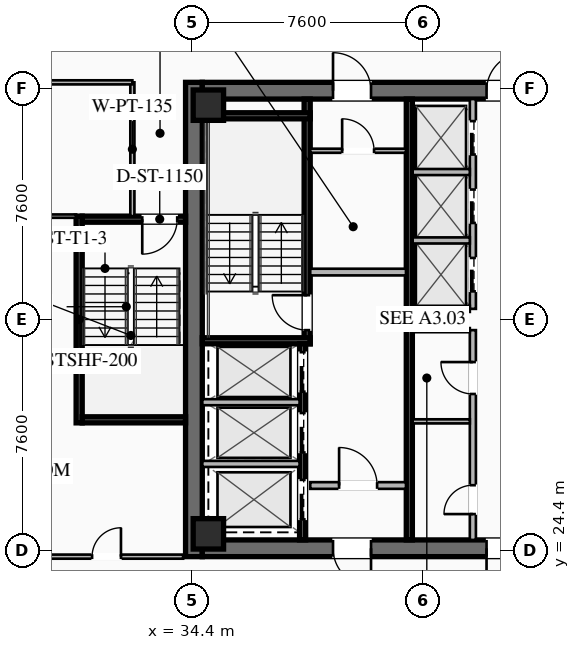
"""IFC4 building model, lengths in metres.
Left out: names, types, materials, properties, quantities, classifications, styles, units other than length and angle.
Written with IfcOpenShell. Run it as: python <this file> out.ifc"""

import sys

from ifc_helpers import new_model, si_unit, direction, frame, frame_2d, origin, origin_2d, place, context, subcontext, project, spatial, rectangle, hollow_rectangle, extrude, element, fill, save


model = new_model("IFC4")
c1 = context("Model", 3, precision=1e-05, world=origin(), true_north=direction((0.0, 1.0)))
c2 = subcontext(c1, "Body", "Model", "MODEL_VIEW")
j1 = project(units=[si_unit("LENGTHUNIT", "METRE"), si_unit("PLANEANGLEUNIT", "RADIAN")], contexts=[c1])
p1 = place(None, origin())
s1 = spatial("IfcSite", under=j1, at=p1, CompositionType="ELEMENT")
p2 = place(p1, origin())
s2 = spatial("IfcBuilding", under=s1, at=p2, CompositionType="ELEMENT")
p3 = place(p2, frame((0.0, 0.0, 149.9)))
s3 = spatial("IfcBuildingStorey", under=s2, at=p3, CompositionType="ELEMENT", Elevation=149.9)
p4 = place(p3, frame((34.475, 24.2, 0.0), z_axis=(0.0, 0.0, 1.0), x_axis=(0.0, 1.0, 0.0)))
e1 = element("IfcWall", 1, at=p4, inside=s3, PredefinedType="SHEAR", context=c2, shape_type="SweptSolid", body=[
    extrude(rectangle(XDim=15.6, YDim=0.55, at=frame_2d((7.8, 0.0))), origin(), (0.0, 0.0, 1.0), 3.55),
])
p5 = place(p3, frame((49.25, 24.475, 0.0), z_axis=(0.0, 0.0, 1.0), x_axis=(-1.0, 0.0, 0.0)))
e2 = element("IfcWall", 2, at=p5, inside=s3, PredefinedType="SHEAR", context=c2, shape_type="SweptSolid", body=[
    extrude(rectangle(XDim=14.5, YDim=0.55, at=frame_2d((7.25, 0.0))), origin(), (0.0, 0.0, 1.0), 3.55),
])
p6 = place(p5, frame((8.95, 0.0, 0.0)))
e3 = element("IfcOpeningElement", 3, at=p6, cuts=e2, PredefinedType="OPENING", context=c2, shape_type="SweptSolid", body=[
    extrude(rectangle(XDim=1.25, YDim=2.25, at=frame_2d((0.625, 1.125))), frame((0.0, 0.285, 0.0), z_axis=(0.0, -1.0, 0.0), x_axis=(1.0, 0.0, 0.0)), (0.0, 0.0, 1.0), 0.57),
])
p7 = place(p5, frame((3.9, 0.0, 0.0)))
e4 = element("IfcOpeningElement", 4, at=p7, cuts=e2, PredefinedType="OPENING", context=c2, shape_type="SweptSolid", body=[
    extrude(rectangle(XDim=1.25, YDim=2.25, at=frame_2d((0.625, 1.125))), frame((0.0, 0.285, 0.0), z_axis=(0.0, -1.0, 0.0), x_axis=(1.0, 0.0, 0.0)), (0.0, 0.0, 1.0), 0.57),
])
p8 = place(p3, frame((34.75, 39.525, 0.0), z_axis=(0.0, 0.0, 1.0), x_axis=(1.0, 0.0, 0.0)))
e5 = element("IfcWall", 5, at=p8, inside=s3, PredefinedType="SHEAR", context=c2, shape_type="SweptSolid", body=[
    extrude(rectangle(XDim=14.5, YDim=0.55, at=frame_2d((7.25, 0.0))), origin(), (0.0, 0.0, 1.0), 3.55),
])
p9 = place(p8, frame((4.3, 0.0, 0.0)))
e6 = element("IfcOpeningElement", 6, at=p9, cuts=e5, PredefinedType="OPENING", context=c2, shape_type="SweptSolid", body=[
    extrude(rectangle(XDim=1.25, YDim=2.25, at=frame_2d((0.625, 1.125))), frame((0.0, 0.285, 0.0), z_axis=(0.0, -1.0, 0.0), x_axis=(1.0, 0.0, 0.0)), (0.0, 0.0, 1.0), 0.57),
])
p10 = place(p8, frame((9.35, 0.0, 0.0)))
e7 = element("IfcOpeningElement", 7, at=p10, cuts=e5, PredefinedType="OPENING", context=c2, shape_type="SweptSolid", body=[
    extrude(rectangle(XDim=1.25, YDim=2.25, at=frame_2d((0.625, 1.125))), frame((0.0, 0.285, 0.0), z_axis=(0.0, -1.0, 0.0), x_axis=(1.0, 0.0, 0.0)), (0.0, 0.0, 1.0), 0.57),
])
for number, where, z_axis, x_axis in (
    (8, (34.95, 24.95, 0.0), (0.0, 0.0, 1.0), (1.0, 0.0, 0.0)),
    (9, (34.95, 39.05, 0.0), (0.0, 0.0, 1.0), (1.0, 0.0, 0.0)),
):
    element("IfcColumn", number, at=place(p3, frame(where, z_axis=z_axis, x_axis=x_axis)), inside=s3, PredefinedType="COLUMN", context=c2, shape_type="SweptSolid", body=[
        extrude(hollow_rectangle(XDim=1.0, YDim=1.0, WallThickness=0.04, at=origin_2d()), origin(), (0.0, 0.0, 1.0), 3.37),
    ])
p11 = place(p3, frame((38.2, 31.2, 0.0), z_axis=(0.0, 0.0, 1.0), x_axis=(0.0, 1.0, 0.0)))
e10 = element("IfcWall", 10, at=p11, inside=s3, PredefinedType="SHEAR", context=c2, shape_type="SweptSolid", body=[
    extrude(rectangle(XDim=8.05, YDim=0.2, at=frame_2d((4.025, 0.0))), origin(), (0.0, 0.0, 1.0), 3.37),
])
p12 = place(p11, frame((0.45, 0.0, 0.0)))
e11 = element("IfcOpeningElement", 11, at=p12, cuts=e10, PredefinedType="OPENING", context=c2, shape_type="SweptSolid", body=[
    extrude(rectangle(XDim=1.15, YDim=2.2, at=frame_2d((0.575, 1.1))), frame((0.0, 0.11, 0.0), z_axis=(0.0, -1.0, 0.0), x_axis=(1.0, 0.0, 0.0)), (0.0, 0.0, 1.0), 0.22),
])
for number, where, z_axis, x_axis in (
    (12, (34.75, 31.3, 0.0), (0.0, 0.0, 1.0), (1.0, 0.0, 0.0)),
    (13, (34.75, 38.7, 0.0), (0.0, 0.0, 1.0), (1.0, 0.0, 0.0)),
):
    element("IfcWall", number, at=place(p3, frame(where, z_axis=z_axis, x_axis=x_axis)), inside=s3, PredefinedType="SHEAR", context=c2, shape_type="SweptSolid", body=[
        extrude(rectangle(XDim=3.55, YDim=0.2, at=frame_2d((1.775, 0.0))), origin(), (0.0, 0.0, 1.0), 3.37),
    ])
p13 = place(p3, frame((41.56, 24.75, 0.0), z_axis=(0.0, 0.0, 1.0), x_axis=(0.0, 1.0, 0.0)))
e14 = element("IfcWall", 14, at=p13, inside=s3, PredefinedType="SHEAR", context=c2, shape_type="SweptSolid", body=[
    extrude(rectangle(XDim=14.5, YDim=0.2, at=frame_2d((7.25, 0.0))), origin(), (0.0, 0.0, 1.0), 3.37),
])
p14 = place(p3, frame((38.3, 33.56, 0.0), z_axis=(0.0, 0.0, 1.0), x_axis=(1.0, 0.0, 0.0)))
e15 = element("IfcWall", 15, at=p14, inside=s3, PredefinedType="SOLIDWALL", context=c2, shape_type="SweptSolid", body=[
    extrude(rectangle(XDim=3.15, YDim=0.22, at=frame_2d((1.575, 0.0))), origin(), (0.0, 0.0, 1.0), 2.723),
])
p15 = place(p3, frame((38.3, 26.54, 0.0), z_axis=(0.0, 0.0, 1.0), x_axis=(1.0, 0.0, 0.0)))
e16 = element("IfcWall", 16, at=p15, inside=s3, PredefinedType="SOLIDWALL", context=c2, shape_type="SweptSolid", body=[
    extrude(rectangle(XDim=3.15, YDim=0.22, at=frame_2d((1.575, 0.0))), origin(), (0.0, 0.0, 1.0), 2.723),
])
p16 = place(p15, frame((0.95, 0.0, 0.0)))
e17 = element("IfcOpeningElement", 17, at=p16, cuts=e16, PredefinedType="OPENING", context=c2, shape_type="SweptSolid", body=[
    extrude(rectangle(XDim=1.25, YDim=2.25, at=frame_2d((0.625, 1.125))), frame((0.0, 0.12, 0.0), z_axis=(0.0, -1.0, 0.0), x_axis=(1.0, 0.0, 0.0)), (0.0, 0.0, 1.0), 0.24),
])
p17 = place(p3, frame((38.05, 24.75, 0.0), z_axis=(0.0, 0.0, 1.0), x_axis=(0.0, 1.0, 0.0)))
e18 = element("IfcWall", 18, at=p17, inside=s3, PredefinedType="SHEAR", context=c2, shape_type="SweptSolid", body=[
    extrude(rectangle(XDim=6.45, YDim=0.2, at=frame_2d((3.225, 0.0))), origin(), (0.0, 0.0, 1.0), 3.37),
])
p18 = place(p17, frame((4.875, 0.0, 0.0)))
e19 = element("IfcOpeningElement", 19, at=p18, cuts=e18, PredefinedType="OPENING", context=c2, shape_type="SweptSolid", body=[
    extrude(rectangle(XDim=1.3, YDim=2.25, at=frame_2d((0.65, 1.125))), frame((0.0, 0.11, 0.0), z_axis=(0.0, -1.0, 0.0), x_axis=(1.0, 0.0, 0.0)), (0.0, 0.0, 1.0), 0.22),
])
p19 = place(p17, frame((2.875, 0.0, 0.0)))
e20 = element("IfcOpeningElement", 20, at=p19, cuts=e18, PredefinedType="OPENING", context=c2, shape_type="SweptSolid", body=[
    extrude(rectangle(XDim=1.3, YDim=2.25, at=frame_2d((0.65, 1.125))), frame((0.0, 0.11, 0.0), z_axis=(0.0, -1.0, 0.0), x_axis=(1.0, 0.0, 0.0)), (0.0, 0.0, 1.0), 0.22),
])
p20 = place(p17, frame((0.675, 0.0, 0.0)))
e21 = element("IfcOpeningElement", 21, at=p20, cuts=e18, PredefinedType="OPENING", context=c2, shape_type="SweptSolid", body=[
    extrude(rectangle(XDim=1.3, YDim=2.25, at=frame_2d((0.65, 1.125))), frame((0.0, 0.11, 0.0), z_axis=(0.0, -1.0, 0.0), x_axis=(1.0, 0.0, 0.0)), (0.0, 0.0, 1.0), 0.22),
])
for number, where, z_axis, x_axis in (
    (22, (34.75, 27.25, 0.0), (0.0, 0.0, 1.0), (1.0, 0.0, 0.0)),
    (23, (34.75, 29.28, 0.0), (0.0, 0.0, 1.0), (1.0, 0.0, 0.0)),
):
    element("IfcWall", number, at=place(p3, frame(where, z_axis=z_axis, x_axis=x_axis)), inside=s3, PredefinedType="SOLIDWALL", context=c2, shape_type="SweptSolid", body=[
        extrude(rectangle(XDim=3.2, YDim=0.2, at=frame_2d((1.6, 0.0))), origin(), (0.0, 0.0, 1.0), 3.37),
    ])
p21 = place(p3, frame((38.3, 37.55, 0.0), z_axis=(0.0, 0.0, 1.0), x_axis=(1.0, 0.0, 0.0)))
e24 = element("IfcWall", 24, at=p21, inside=s3, PredefinedType="PARTITIONING", context=c2, shape_type="SweptSolid", body=[
    extrude(rectangle(XDim=3.15, YDim=0.135, at=frame_2d((1.575, 0.0))), origin(), (0.0, 0.0, 1.0), 2.723),
])
p22 = place(p21, frame((1.05, 0.0, 0.0)))
e25 = element("IfcOpeningElement", 25, at=p22, cuts=e24, PredefinedType="OPENING", context=c2, shape_type="SweptSolid", body=[
    extrude(rectangle(XDim=1.05, YDim=2.2, at=frame_2d((0.525, 1.1))), frame((0.0, 0.077, 0.0), z_axis=(0.0, -1.0, 0.0), x_axis=(1.0, 0.0, 0.0)), (0.0, 0.0, 1.0), 0.155),
])
p23 = place(p3, frame((43.65, 24.75, 0.0), z_axis=(0.0, 0.0, 1.0), x_axis=(0.0, 1.0, 0.0)))
e26 = element("IfcWall", 26, at=p23, inside=s3, PredefinedType="SOLIDWALL", context=c2, shape_type="SweptSolid", body=[
    extrude(rectangle(XDim=6.9, YDim=0.2, at=frame_2d((3.45, 0.0))), origin(), (0.0, 0.0, 1.0), 2.723),
])
p24 = place(p23, frame((0.85, 0.0, 0.0)))
e27 = element("IfcOpeningElement", 27, at=p24, cuts=e26, PredefinedType="OPENING", context=c2, shape_type="SweptSolid", body=[
    extrude(rectangle(XDim=0.95, YDim=2.05, at=frame_2d((0.475, 1.025))), frame((0.0, 0.11, 0.0), z_axis=(0.0, -1.0, 0.0), x_axis=(1.0, 0.0, 0.0)), (0.0, 0.0, 1.0), 0.22),
])
p25 = place(p23, frame((4.8, 0.0, 0.0)))
e28 = element("IfcOpeningElement", 28, at=p25, cuts=e26, PredefinedType="OPENING", context=c2, shape_type="SweptSolid", body=[
    extrude(rectangle(XDim=1.05, YDim=2.2, at=frame_2d((0.525, 1.1))), frame((0.0, 0.11, 0.0), z_axis=(0.0, -1.0, 0.0), x_axis=(1.0, 0.0, 0.0)), (0.0, 0.0, 1.0), 0.22),
])
for number, where, z_axis, x_axis in (
    (29, (41.67, 31.65, 0.0), (0.0, 0.0, 1.0), (1.0, 0.0, 0.0)),
    (30, (41.67, 28.65, 0.0), (0.0, 0.0, 1.0), (1.0, 0.0, 0.0)),
):
    element("IfcWall", number, at=place(p3, frame(where, z_axis=z_axis, x_axis=x_axis)), inside=s3, PredefinedType="PARTITIONING", context=c2, shape_type="SweptSolid", body=[
        extrude(rectangle(XDim=1.88, YDim=0.135, at=frame_2d((0.94, 0.0))), origin(), (0.0, 0.0, 1.0), 2.723),
    ])
p26 = place(p3, frame((43.65, 32.35, 0.0), z_axis=(0.0, 0.0, 1.0), x_axis=(0.0, 1.0, 0.0)))
e31 = element("IfcWall", 31, at=p26, inside=s3, PredefinedType="SOLIDWALL", context=c2, shape_type="SweptSolid", body=[
    extrude(rectangle(XDim=6.9, YDim=0.2, at=frame_2d((3.45, 0.0))), origin(), (0.0, 0.0, 1.0), 3.37),
])
p27 = place(p26, frame((0.575, 0.0, 0.0)))
e32 = element("IfcOpeningElement", 32, at=p27, cuts=e31, PredefinedType="OPENING", context=c2, shape_type="SweptSolid", body=[
    extrude(rectangle(XDim=1.1, YDim=2.2, at=frame_2d((0.55, 1.1))), frame((0.0, 0.11, 0.0), z_axis=(0.0, -1.0, 0.0), x_axis=(1.0, 0.0, 0.0)), (0.0, 0.0, 1.0), 0.22),
])
p28 = place(p26, frame((2.825, 0.0, 0.0)))
e33 = element("IfcOpeningElement", 33, at=p28, cuts=e31, PredefinedType="OPENING", context=c2, shape_type="SweptSolid", body=[
    extrude(rectangle(XDim=1.1, YDim=2.2, at=frame_2d((0.55, 1.1))), frame((0.0, 0.11, 0.0), z_axis=(0.0, -1.0, 0.0), x_axis=(1.0, 0.0, 0.0)), (0.0, 0.0, 1.0), 0.22),
])
p29 = place(p26, frame((5.075, 0.0, 0.0)))
e34 = element("IfcOpeningElement", 34, at=p29, cuts=e31, PredefinedType="OPENING", context=c2, shape_type="SweptSolid", body=[
    extrude(rectangle(XDim=1.1, YDim=2.2, at=frame_2d((0.55, 1.1))), frame((0.0, 0.11, 0.0), z_axis=(0.0, -1.0, 0.0), x_axis=(1.0, 0.0, 0.0)), (0.0, 0.0, 1.0), 0.22),
])
for number, where, z_axis, x_axis in (
    (35, (41.67, 32.35, 0.0), (0.0, 0.0, 1.0), (1.0, 0.0, 0.0)),
    (36, (41.67, 34.6, 0.0), (0.0, 0.0, 1.0), (1.0, 0.0, 0.0)),
    (37, (41.67, 36.85, 0.0), (0.0, 0.0, 1.0), (1.0, 0.0, 0.0)),
):
    element("IfcWall", number, at=place(p3, frame(where, z_axis=z_axis, x_axis=x_axis)), inside=s3, PredefinedType="SOLIDWALL", context=c2, shape_type="SweptSolid", body=[
        extrude(rectangle(XDim=1.88, YDim=0.2, at=frame_2d((0.94, 0.0))), origin(), (0.0, 0.0, 1.0), 3.37),
    ])
p30 = place(p3, frame((30.7, 28.6, 0.0), z_axis=(0.0, 0.0, 1.0), x_axis=(0.0, 1.0, 0.0)))
e38 = element("IfcWall", 38, at=p30, inside=s3, PredefinedType="SHEAR", context=c2, shape_type="SweptSolid", body=[
    extrude(rectangle(XDim=6.8, YDim=0.2, at=frame_2d((3.4, 0.0))), origin(), (0.0, 0.0, 1.0), 3.37),
])
p31 = place(p3, frame((34.2, 35.3, 0.0), z_axis=(0.0, 0.0, 1.0), x_axis=(-1.0, 0.0, 0.0)))
e39 = element("IfcWall", 39, at=p31, inside=s3, PredefinedType="SHEAR", context=c2, shape_type="SweptSolid", body=[
    extrude(rectangle(XDim=3.4, YDim=0.2, at=frame_2d((1.7, 0.0))), origin(), (0.0, 0.0, 1.0), 3.37),
])
p32 = place(p31, frame((0.275, 0.0, 0.0)))
e40 = element("IfcOpeningElement", 40, at=p32, cuts=e39, PredefinedType="OPENING", context=c2, shape_type="SweptSolid", body=[
    extrude(rectangle(XDim=1.15, YDim=2.2, at=frame_2d((0.575, 1.1))), frame((0.0, 0.11, 0.0), z_axis=(0.0, -1.0, 0.0), x_axis=(1.0, 0.0, 0.0)), (0.0, 0.0, 1.0), 0.22),
])
p33 = place(p3, frame((30.8, 28.7, 0.0), z_axis=(0.0, 0.0, 1.0), x_axis=(1.0, 0.0, 0.0)))
e41 = element("IfcWall", 41, at=p33, inside=s3, PredefinedType="SHEAR", context=c2, shape_type="SweptSolid", body=[
    extrude(rectangle(XDim=3.4, YDim=0.2, at=frame_2d((1.7, 0.0))), origin(), (0.0, 0.0, 1.0), 3.37),
])
p34 = place(p3, frame((32.45, 35.4, 0.0), z_axis=(0.0, 0.0, 1.0), x_axis=(0.0, 1.0, 0.0)))
e42 = element("IfcWall", 42, at=p34, inside=s3, PredefinedType="PARTITIONING", context=c2, shape_type="SweptSolid", body=[
    extrude(rectangle(XDim=4.4, YDim=0.135, at=frame_2d((2.2, 0.0))), origin(), (0.0, 0.0, 1.0), 2.723),
])
p35 = place(p3, frame((32.45, 39.8, 0.0), z_axis=(0.0, 0.0, 1.0), x_axis=(-1.0, 0.0, 0.0)))
e43 = element("IfcWall", 43, at=p35, inside=s3, PredefinedType="PARTITIONING", context=c2, shape_type="SweptSolid", body=[
    extrude(rectangle(XDim=9.73, YDim=0.135, at=frame_2d((4.865, 0.0))), origin(), (0.0, 0.0, 1.0), 2.723),
])
p36 = place(p35, frame((4.04, 0.0, 0.0)))
e44 = element("IfcOpeningElement", 44, at=p36, cuts=e43, PredefinedType="OPENING", context=c2, shape_type="SweptSolid", body=[
    extrude(rectangle(XDim=0.95, YDim=2.05, at=frame_2d((0.475, 1.025))), frame((0.0, 0.077, 0.0), z_axis=(0.0, -1.0, 0.0), x_axis=(1.0, 0.0, 0.0)), (0.0, 0.0, 1.0), 0.155),
])
p37 = place(p3, frame((22.72, 24.2, 0.0), z_axis=(0.0, 0.0, 1.0), x_axis=(1.0, 0.0, 0.0)))
e45 = element("IfcWall", 45, at=p37, inside=s3, PredefinedType="PARTITIONING", context=c2, shape_type="SweptSolid", body=[
    extrude(rectangle(XDim=11.4, YDim=0.135, at=frame_2d((5.7, 0.0))), origin(), (0.0, 0.0, 1.0), 2.723),
])
p38 = place(p37, frame((8.405, 0.0, 0.0)))
e46 = element("IfcOpeningElement", 46, at=p38, cuts=e45, PredefinedType="OPENING", context=c2, shape_type="SweptSolid", body=[
    extrude(rectangle(XDim=0.95, YDim=2.05, at=frame_2d((0.475, 1.025))), frame((0.0, 0.077, 0.0), z_axis=(0.0, -1.0, 0.0), x_axis=(1.0, 0.0, 0.0)), (0.0, 0.0, 1.0), 0.155),
])
p39 = place(p3, frame((30.6, 35.4, 0.0), z_axis=(0.0, 0.0, 1.0), x_axis=(-1.0, 0.0, 0.0)))
e47 = element("IfcWall", 47, at=p39, inside=s3, PredefinedType="PARTITIONING", context=c2, shape_type="SweptSolid", body=[
    extrude(rectangle(XDim=7.88, YDim=0.11, at=frame_2d((3.94, 0.0))), origin(), (0.0, 0.0, 1.0), 2.723),
])
p40 = place(p9, origin())
e48 = element("IfcDoor", 48, at=p40, inside=s3, OperationType="SINGLE_SWING_LEFT", PredefinedType="DOOR", context=c2, shape_type="SweptSolid", body=[
    extrude(rectangle(XDim=1.25, YDim=2.25, at=frame_2d((0.625, 1.125))), frame((0.0, 0.025, 0.0), z_axis=(0.0, -1.0, 0.0), x_axis=(1.0, 0.0, 0.0)), (0.0, 0.0, 1.0), 0.05),
])
fill(e6, e48)
p41 = place(p10, origin())
e49 = element("IfcDoor", 49, at=p41, inside=s3, OperationType="SINGLE_SWING_RIGHT", PredefinedType="DOOR", context=c2, shape_type="SweptSolid", body=[
    extrude(rectangle(XDim=1.25, YDim=2.25, at=frame_2d((0.625, 1.125))), frame((0.0, 0.025, 0.0), z_axis=(0.0, -1.0, 0.0), x_axis=(1.0, 0.0, 0.0)), (0.0, 0.0, 1.0), 0.05),
])
fill(e7, e49)
p42 = place(p6, origin())
e50 = element("IfcDoor", 50, at=p42, inside=s3, OperationType="SINGLE_SWING_LEFT", PredefinedType="DOOR", context=c2, shape_type="SweptSolid", body=[
    extrude(rectangle(XDim=1.25, YDim=2.25, at=frame_2d((0.625, 1.125))), frame((0.0, 0.025, 0.0), z_axis=(0.0, -1.0, 0.0), x_axis=(1.0, 0.0, 0.0)), (0.0, 0.0, 1.0), 0.05),
])
fill(e3, e50)
p43 = place(p7, origin())
e51 = element("IfcDoor", 51, at=p43, inside=s3, OperationType="SINGLE_SWING_RIGHT", PredefinedType="DOOR", context=c2, shape_type="SweptSolid", body=[
    extrude(rectangle(XDim=1.25, YDim=2.25, at=frame_2d((0.625, 1.125))), frame((0.0, 0.025, 0.0), z_axis=(0.0, -1.0, 0.0), x_axis=(1.0, 0.0, 0.0)), (0.0, 0.0, 1.0), 0.05),
])
fill(e4, e51)
p44 = place(p12, origin())
e52 = element("IfcDoor", 52, at=p44, inside=s3, OperationType="SINGLE_SWING_RIGHT", PredefinedType="DOOR", context=c2, shape_type="SweptSolid", body=[
    extrude(rectangle(XDim=1.15, YDim=2.2, at=frame_2d((0.575, 1.1))), frame((0.0, 0.025, 0.0), z_axis=(0.0, -1.0, 0.0), x_axis=(1.0, 0.0, 0.0)), (0.0, 0.0, 1.0), 0.05),
])
fill(e11, e52)
p45 = place(p16, origin())
e53 = element("IfcDoor", 53, at=p45, inside=s3, OperationType="SINGLE_SWING_LEFT", PredefinedType="DOOR", context=c2, shape_type="SweptSolid", body=[
    extrude(rectangle(XDim=1.25, YDim=2.25, at=frame_2d((0.625, 1.125))), frame((0.0, 0.025, 0.0), z_axis=(0.0, -1.0, 0.0), x_axis=(1.0, 0.0, 0.0)), (0.0, 0.0, 1.0), 0.05),
])
fill(e17, e53)
p46 = place(p22, origin())
e54 = element("IfcDoor", 54, at=p46, inside=s3, OperationType="SINGLE_SWING_LEFT", PredefinedType="DOOR", context=c2, shape_type="SweptSolid", body=[
    extrude(rectangle(XDim=1.05, YDim=2.2, at=frame_2d((0.525, 1.1))), frame((0.0, 0.025, 0.0), z_axis=(0.0, -1.0, 0.0), x_axis=(1.0, 0.0, 0.0)), (0.0, 0.0, 1.0), 0.05),
])
fill(e25, e54)
p47 = place(p24, origin())
e55 = element("IfcDoor", 55, at=p47, inside=s3, OperationType="SINGLE_SWING_LEFT", PredefinedType="DOOR", context=c2, shape_type="SweptSolid", body=[
    extrude(rectangle(XDim=0.95, YDim=2.05, at=frame_2d((0.475, 1.025))), frame((0.0, 0.025, 0.0), z_axis=(0.0, -1.0, 0.0), x_axis=(1.0, 0.0, 0.0)), (0.0, 0.0, 1.0), 0.05),
])
fill(e27, e55)
p48 = place(p25, origin())
e56 = element("IfcDoor", 56, at=p48, inside=s3, OperationType="SINGLE_SWING_RIGHT", PredefinedType="DOOR", context=c2, shape_type="SweptSolid", body=[
    extrude(rectangle(XDim=1.05, YDim=2.2, at=frame_2d((0.525, 1.1))), frame((0.0, 0.025, 0.0), z_axis=(0.0, -1.0, 0.0), x_axis=(1.0, 0.0, 0.0)), (0.0, 0.0, 1.0), 0.05),
])
fill(e28, e56)
p49 = place(p32, origin())
e57 = element("IfcDoor", 57, at=p49, inside=s3, OperationType="SINGLE_SWING_RIGHT", PredefinedType="DOOR", context=c2, shape_type="SweptSolid", body=[
    extrude(rectangle(XDim=1.15, YDim=2.2, at=frame_2d((0.575, 1.1))), frame((0.0, 0.025, 0.0), z_axis=(0.0, -1.0, 0.0), x_axis=(1.0, 0.0, 0.0)), (0.0, 0.0, 1.0), 0.05),
])
fill(e40, e57)
p50 = place(p38, origin())
e58 = element("IfcDoor", 58, at=p50, inside=s3, OperationType="SINGLE_SWING_RIGHT", PredefinedType="DOOR", context=c2, shape_type="SweptSolid", body=[
    extrude(rectangle(XDim=0.95, YDim=2.05, at=frame_2d((0.475, 1.025))), frame((0.0, 0.025, 0.0), z_axis=(0.0, -1.0, 0.0), x_axis=(1.0, 0.0, 0.0)), (0.0, 0.0, 1.0), 0.05),
])
fill(e46, e58)
p51 = place(p18, origin())
e59 = element("IfcDoor", 59, at=p51, inside=s3, OperationType="SLIDING_TO_LEFT", PredefinedType="DOOR", context=c2, shape_type="SweptSolid", body=[
    extrude(rectangle(XDim=1.3, YDim=2.25, at=frame_2d((0.65, 1.125))), frame((0.0, 0.025, 0.0), z_axis=(0.0, -1.0, 0.0), x_axis=(1.0, 0.0, 0.0)), (0.0, 0.0, 1.0), 0.05),
])
fill(e19, e59)
p52 = place(p19, origin())
e60 = element("IfcDoor", 60, at=p52, inside=s3, OperationType="SLIDING_TO_LEFT", PredefinedType="DOOR", context=c2, shape_type="SweptSolid", body=[
    extrude(rectangle(XDim=1.3, YDim=2.25, at=frame_2d((0.65, 1.125))), frame((0.0, 0.025, 0.0), z_axis=(0.0, -1.0, 0.0), x_axis=(1.0, 0.0, 0.0)), (0.0, 0.0, 1.0), 0.05),
])
fill(e20, e60)
p53 = place(p20, origin())
e61 = element("IfcDoor", 61, at=p53, inside=s3, OperationType="SLIDING_TO_LEFT", PredefinedType="DOOR", context=c2, shape_type="SweptSolid", body=[
    extrude(rectangle(XDim=1.3, YDim=2.25, at=frame_2d((0.65, 1.125))), frame((0.0, 0.025, 0.0), z_axis=(0.0, -1.0, 0.0), x_axis=(1.0, 0.0, 0.0)), (0.0, 0.0, 1.0), 0.05),
])
fill(e21, e61)
p54 = place(p27, origin())
e62 = element("IfcDoor", 62, at=p54, inside=s3, OperationType="SLIDING_TO_LEFT", PredefinedType="DOOR", context=c2, shape_type="SweptSolid", body=[
    extrude(rectangle(XDim=1.1, YDim=2.2, at=frame_2d((0.55, 1.1))), frame((0.0, 0.025, 0.0), z_axis=(0.0, -1.0, 0.0), x_axis=(1.0, 0.0, 0.0)), (0.0, 0.0, 1.0), 0.05),
])
fill(e32, e62)
p55 = place(p28, origin())
e63 = element("IfcDoor", 63, at=p55, inside=s3, OperationType="SLIDING_TO_LEFT", PredefinedType="DOOR", context=c2, shape_type="SweptSolid", body=[
    extrude(rectangle(XDim=1.1, YDim=2.2, at=frame_2d((0.55, 1.1))), frame((0.0, 0.025, 0.0), z_axis=(0.0, -1.0, 0.0), x_axis=(1.0, 0.0, 0.0)), (0.0, 0.0, 1.0), 0.05),
])
fill(e33, e63)
p56 = place(p29, origin())
e64 = element("IfcDoor", 64, at=p56, inside=s3, OperationType="SLIDING_TO_LEFT", PredefinedType="DOOR", context=c2, shape_type="SweptSolid", body=[
    extrude(rectangle(XDim=1.1, YDim=2.2, at=frame_2d((0.55, 1.1))), frame((0.0, 0.025, 0.0), z_axis=(0.0, -1.0, 0.0), x_axis=(1.0, 0.0, 0.0)), (0.0, 0.0, 1.0), 0.05),
])
fill(e34, e64)
save(model, sys.argv[1])
